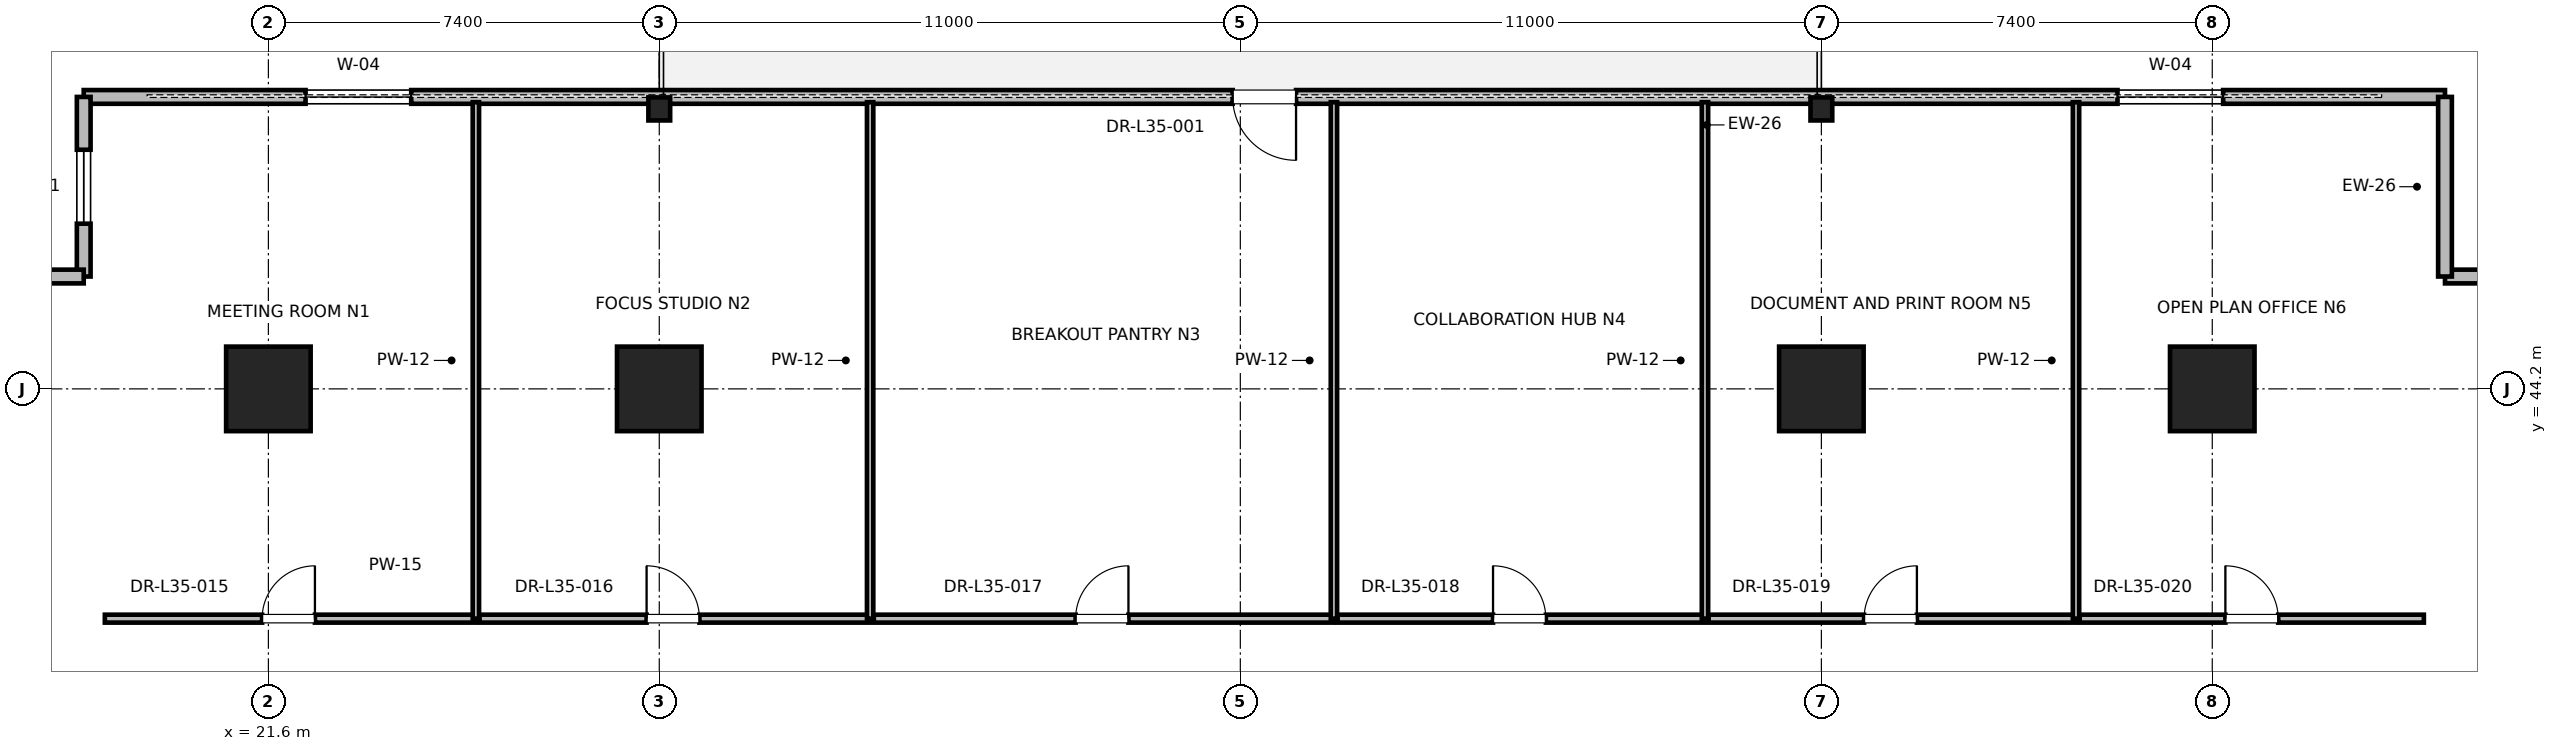
"""IFC4 building model, lengths in metres.
Left out: names, types, materials, properties, quantities, classifications, styles, units other than length and angle.
Written with IfcOpenShell. Run it as: python <this file> out.ifc"""

import sys

from ifc_helpers import new_model, si_unit, direction, frame, frame_2d, origin, origin_2d, place, context, subcontext, project, spatial, rectangle, i_section, extrude, element, fill, save


model = new_model("IFC4")
c1 = context("Model", 3, precision=1e-05, world=origin(), true_north=direction((0.0, 1.0)))
c2 = subcontext(c1, "Body", "Model", "MODEL_VIEW")
j1 = project(units=[si_unit("LENGTHUNIT", "METRE"), si_unit("PLANEANGLEUNIT", "RADIAN")], contexts=[c1])
p1 = place(None, origin())
s1 = spatial("IfcSite", under=j1, at=p1, CompositionType="ELEMENT")
p2 = place(p1, origin())
s2 = spatial("IfcBuilding", under=s1, at=p2, CompositionType="ELEMENT")
p3 = place(p2, frame((0.0, 0.0, 152.4)))
s3 = spatial("IfcBuildingStorey", under=s2, at=p3, CompositionType="ELEMENT", Elevation=152.4)
for number, where, z_axis, x_axis in (
    (1, (29.0, 44.2, 0.0), (0.0, 0.0, 1.0), (1.0, 0.0, 0.0)),
    (2, (51.0, 44.2, 0.0), (0.0, 0.0, 1.0), (1.0, 0.0, 0.0)),
    (3, (21.6, 44.2, 0.0), (0.0, 0.0, 1.0), (1.0, 0.0, 0.0)),
    (4, (58.4, 44.2, 0.0), (0.0, 0.0, 1.0), (1.0, 0.0, 0.0)),
):
    element("IfcColumn", number, at=place(p3, frame(where, z_axis=z_axis, x_axis=x_axis)), inside=s3, PredefinedType="COLUMN", context=c2, shape_type="SweptSolid", body=[
        extrude(rectangle(XDim=1.6, YDim=1.6, at=origin_2d()), origin(), (0.0, 0.0, 1.0), 4.0),
    ])
for number, where, z_axis, x_axis in (
    (5, (29.0, 49.5, 0.0), (0.0, 0.0, 1.0), (1.0, 0.0, 0.0)),
    (6, (51.0, 49.5, 0.0), (0.0, 0.0, 1.0), (1.0, 0.0, 0.0)),
):
    element("IfcColumn", number, at=place(p3, frame(where, z_axis=z_axis, x_axis=x_axis)), inside=s3, PredefinedType="COLUMN", context=c2, shape_type="SweptSolid", body=[
        extrude(i_section(OverallWidth=0.412, OverallDepth=0.437, WebThickness=0.036, FlangeThickness=0.058, FilletRadius=0.015, at=origin_2d()), origin(), (0.0, 0.0, 1.0), 4.0),
    ])
p4 = place(p3, frame((62.806, 49.727, 0.0), z_axis=(0.0, 0.0, 1.0), x_axis=(-1.0, 0.0, 0.0)))
e7 = element("IfcWall", 7, at=p4, inside=s3, PredefinedType="PARAPET", context=c2, shape_type="SweptSolid", body=[
    extrude(rectangle(XDim=44.702, YDim=0.26, at=frame_2d((22.351, 0.0))), origin(), (0.0, 0.0, 1.0), 2.97),
])
p5 = place(p4, frame((4.2, 0.0, 0.85)))
e8 = element("IfcOpeningElement", 8, at=p5, cuts=e7, PredefinedType="OPENING", context=c2, shape_type="SweptSolid", body=[
    extrude(rectangle(XDim=2.0, YDim=2.3, at=frame_2d((1.0, 1.15))), frame((0.0, 0.13, 0.0), z_axis=(0.0, -1.0, 0.0), x_axis=(1.0, 0.0, 0.0)), (0.0, 0.0, 1.0), 0.26),
])
p6 = place(p4, frame((21.751, 0.0, 0.0)))
e9 = element("IfcOpeningElement", 9, at=p6, cuts=e7, PredefinedType="OPENING", context=c2, shape_type="SweptSolid", body=[
    extrude(rectangle(XDim=1.2, YDim=2.2, at=frame_2d((0.6, 1.1))), frame((0.0, 0.13, 0.0), z_axis=(0.0, -1.0, 0.0), x_axis=(1.0, 0.0, 0.0)), (0.0, 0.0, 1.0), 0.26),
])
p7 = place(p4, frame((38.502, 0.0, 0.85)))
e10 = element("IfcOpeningElement", 10, at=p7, cuts=e7, PredefinedType="OPENING", context=c2, shape_type="SweptSolid", body=[
    extrude(rectangle(XDim=2.0, YDim=2.3, at=frame_2d((1.0, 1.15))), frame((0.0, 0.13, 0.0), z_axis=(0.0, -1.0, 0.0), x_axis=(1.0, 0.0, 0.0)), (0.0, 0.0, 1.0), 0.26),
])
p8 = place(p3, frame((66.606, 46.327, 0.0), z_axis=(0.0, 0.0, 1.0), x_axis=(-1.0, 0.0, 0.0)))
e11 = element("IfcWall", 11, at=p8, inside=s3, PredefinedType="PARAPET", context=c2, shape_type="SweptSolid", body=[
    extrude(rectangle(XDim=3.8, YDim=0.26, at=frame_2d((1.9, 0.0))), origin(), (0.0, 0.0, 1.0), 3.775),
])
p9 = place(p8, frame((1.2, 0.0, 0.85)))
e12 = element("IfcOpeningElement", 12, at=p9, cuts=e11, PredefinedType="OPENING", context=c2, shape_type="SweptSolid", body=[
    extrude(rectangle(XDim=1.4, YDim=2.0, at=frame_2d((0.7, 1.0))), frame((0.0, 0.13, 0.0), z_axis=(0.0, -1.0, 0.0), x_axis=(1.0, 0.0, 0.0)), (0.0, 0.0, 1.0), 0.26),
])
p10 = place(p3, frame((62.806, 46.327, 0.0), z_axis=(0.0, 0.0, 1.0), x_axis=(0.0, 1.0, 0.0)))
e13 = element("IfcWall", 13, at=p10, inside=s3, PredefinedType="PARAPET", context=c2, shape_type="SweptSolid", body=[
    extrude(rectangle(XDim=3.4, YDim=0.26, at=frame_2d((1.7, 0.0))), origin(), (0.0, 0.0, 1.0), 3.775),
])
p11 = place(p3, frame((18.104, 49.727, 0.0), z_axis=(0.0, 0.0, 1.0), x_axis=(0.0, -1.0, 0.0)))
e14 = element("IfcWall", 14, at=p11, inside=s3, PredefinedType="PARAPET", context=c2, shape_type="SweptSolid", body=[
    extrude(rectangle(XDim=3.4, YDim=0.26, at=frame_2d((1.7, 0.0))), origin(), (0.0, 0.0, 1.0), 3.775),
])
p12 = place(p11, frame((1.0, 0.0, 0.85)))
e15 = element("IfcOpeningElement", 15, at=p12, cuts=e14, PredefinedType="OPENING", context=c2, shape_type="SweptSolid", body=[
    extrude(rectangle(XDim=1.4, YDim=2.0, at=frame_2d((0.7, 1.0))), frame((0.0, 0.13, 0.0), z_axis=(0.0, -1.0, 0.0), x_axis=(1.0, 0.0, 0.0)), (0.0, 0.0, 1.0), 0.26),
])
p13 = place(p3, frame((18.104, 46.327, 0.0), z_axis=(0.0, 0.0, 1.0), x_axis=(-1.0, 0.0, 0.0)))
e16 = element("IfcWall", 16, at=p13, inside=s3, PredefinedType="PARAPET", context=c2, shape_type="SweptSolid", body=[
    extrude(rectangle(XDim=3.8, YDim=0.26, at=frame_2d((1.9, 0.0))), origin(), (0.0, 0.0, 1.0), 3.775),
])
p14 = place(p3, frame((18.504, 39.85, 0.0), z_axis=(0.0, 0.0, 1.0), x_axis=(1.0, 0.0, 0.0)))
e17 = element("IfcWall", 17, at=p14, inside=s3, PredefinedType="PARTITIONING", context=c2, shape_type="SweptSolid", body=[
    extrude(rectangle(XDim=7.024, YDim=0.15, at=frame_2d((3.512, 0.0))), origin(), (0.0, 0.0, 1.0), 2.85),
])
p15 = place(p14, frame((2.977, 0.0, 0.0)))
e18 = element("IfcOpeningElement", 18, at=p15, cuts=e17, PredefinedType="OPENING", context=c2, shape_type="SweptSolid", body=[
    extrude(rectangle(XDim=1.0, YDim=2.15, at=frame_2d((0.5, 1.075))), frame((0.0, 0.075, 0.0), z_axis=(0.0, -1.0, 0.0), x_axis=(1.0, 0.0, 0.0)), (0.0, 0.0, 1.0), 0.15),
])
p16 = place(p3, frame((25.528, 39.85, 0.0), z_axis=(0.0, 0.0, 1.0), x_axis=(0.0, 1.0, 0.0)))
e19 = element("IfcWall", 19, at=p16, inside=s3, PredefinedType="PARTITIONING", context=c2, shape_type="SweptSolid", body=[
    extrude(rectangle(XDim=9.777, YDim=0.12, at=frame_2d((4.889, 0.0))), origin(), (0.0, 0.0, 1.0), 2.85),
])
p17 = place(p3, frame((25.598, 39.85, 0.0), z_axis=(0.0, 0.0, 1.0), x_axis=(1.0, 0.0, 0.0)))
e20 = element("IfcWall", 20, at=p17, inside=s3, PredefinedType="PARTITIONING", context=c2, shape_type="SweptSolid", body=[
    extrude(rectangle(XDim=7.393, YDim=0.15, at=frame_2d((3.697, 0.0))), origin(), (0.0, 0.0, 1.0), 2.85),
])
p18 = place(p17, frame((3.162, 0.0, 0.0)))
e21 = element("IfcOpeningElement", 21, at=p18, cuts=e20, PredefinedType="OPENING", context=c2, shape_type="SweptSolid", body=[
    extrude(rectangle(XDim=1.0, YDim=2.15, at=frame_2d((0.5, 1.075))), frame((0.0, 0.075, 0.0), z_axis=(0.0, -1.0, 0.0), x_axis=(1.0, 0.0, 0.0)), (0.0, 0.0, 1.0), 0.15),
])
p19 = place(p3, frame((32.992, 39.85, 0.0), z_axis=(0.0, 0.0, 1.0), x_axis=(0.0, 1.0, 0.0)))
e22 = element("IfcWall", 22, at=p19, inside=s3, PredefinedType="PARTITIONING", context=c2, shape_type="SweptSolid", body=[
    extrude(rectangle(XDim=9.777, YDim=0.12, at=frame_2d((4.889, 0.0))), origin(), (0.0, 0.0, 1.0), 2.405),
])
p20 = place(p3, frame((33.062, 39.85, 0.0), z_axis=(0.0, 0.0, 1.0), x_axis=(1.0, 0.0, 0.0)))
e23 = element("IfcWall", 23, at=p20, inside=s3, PredefinedType="PARTITIONING", context=c2, shape_type="SweptSolid", body=[
    extrude(rectangle(XDim=8.71, YDim=0.15, at=frame_2d((4.355, 0.0))), origin(), (0.0, 0.0, 1.0), 2.85),
])
p21 = place(p20, frame((3.82, 0.0, 0.0)))
e24 = element("IfcOpeningElement", 24, at=p21, cuts=e23, PredefinedType="OPENING", context=c2, shape_type="SweptSolid", body=[
    extrude(rectangle(XDim=1.0, YDim=2.15, at=frame_2d((0.5, 1.075))), frame((0.0, 0.075, 0.0), z_axis=(0.0, -1.0, 0.0), x_axis=(1.0, 0.0, 0.0)), (0.0, 0.0, 1.0), 0.15),
])
p22 = place(p3, frame((41.772, 39.85, 0.0), z_axis=(0.0, 0.0, 1.0), x_axis=(0.0, 1.0, 0.0)))
e25 = element("IfcWall", 25, at=p22, inside=s3, PredefinedType="PARTITIONING", context=c2, shape_type="SweptSolid", body=[
    extrude(rectangle(XDim=9.777, YDim=0.12, at=frame_2d((4.889, 0.0))), origin(), (0.0, 0.0, 1.0), 2.405),
])
p23 = place(p3, frame((41.842, 39.85, 0.0), z_axis=(0.0, 0.0, 1.0), x_axis=(1.0, 0.0, 0.0)))
e26 = element("IfcWall", 26, at=p23, inside=s3, PredefinedType="PARTITIONING", context=c2, shape_type="SweptSolid", body=[
    extrude(rectangle(XDim=6.954, YDim=0.15, at=frame_2d((3.477, 0.0))), origin(), (0.0, 0.0, 1.0), 2.85),
])
p24 = place(p23, frame((2.942, 0.0, 0.0)))
e27 = element("IfcOpeningElement", 27, at=p24, cuts=e26, PredefinedType="OPENING", context=c2, shape_type="SweptSolid", body=[
    extrude(rectangle(XDim=1.0, YDim=2.15, at=frame_2d((0.5, 1.075))), frame((0.0, 0.075, 0.0), z_axis=(0.0, -1.0, 0.0), x_axis=(1.0, 0.0, 0.0)), (0.0, 0.0, 1.0), 0.15),
])
p25 = place(p3, frame((48.796, 39.85, 0.0), z_axis=(0.0, 0.0, 1.0), x_axis=(0.0, 1.0, 0.0)))
e28 = element("IfcWall", 28, at=p25, inside=s3, PredefinedType="PARTITIONING", context=c2, shape_type="SweptSolid", body=[
    extrude(rectangle(XDim=9.777, YDim=0.12, at=frame_2d((4.889, 0.0))), origin(), (0.0, 0.0, 1.0), 2.405),
])
p26 = place(p3, frame((48.866, 39.85, 0.0), z_axis=(0.0, 0.0, 1.0), x_axis=(1.0, 0.0, 0.0)))
e29 = element("IfcWall", 29, at=p26, inside=s3, PredefinedType="PARTITIONING", context=c2, shape_type="SweptSolid", body=[
    extrude(rectangle(XDim=6.954, YDim=0.15, at=frame_2d((3.477, 0.0))), origin(), (0.0, 0.0, 1.0), 2.85),
])
p27 = place(p26, frame((2.942, 0.0, 0.0)))
e30 = element("IfcOpeningElement", 30, at=p27, cuts=e29, PredefinedType="OPENING", context=c2, shape_type="SweptSolid", body=[
    extrude(rectangle(XDim=1.0, YDim=2.15, at=frame_2d((0.5, 1.075))), frame((0.0, 0.075, 0.0), z_axis=(0.0, -1.0, 0.0), x_axis=(1.0, 0.0, 0.0)), (0.0, 0.0, 1.0), 0.15),
])
p28 = place(p3, frame((55.821, 39.85, 0.0), z_axis=(0.0, 0.0, 1.0), x_axis=(0.0, 1.0, 0.0)))
e31 = element("IfcWall", 31, at=p28, inside=s3, PredefinedType="PARTITIONING", context=c2, shape_type="SweptSolid", body=[
    extrude(rectangle(XDim=9.777, YDim=0.12, at=frame_2d((4.889, 0.0))), origin(), (0.0, 0.0, 1.0), 2.85),
])
p29 = place(p3, frame((55.891, 39.85, 0.0), z_axis=(0.0, 0.0, 1.0), x_axis=(1.0, 0.0, 0.0)))
e32 = element("IfcWall", 32, at=p29, inside=s3, PredefinedType="PARTITIONING", context=c2, shape_type="SweptSolid", body=[
    extrude(rectangle(XDim=6.515, YDim=0.15, at=frame_2d((3.258, 0.0))), origin(), (0.0, 0.0, 1.0), 2.85),
])
p30 = place(p29, frame((2.758, 0.0, 0.0)))
e33 = element("IfcOpeningElement", 33, at=p30, cuts=e32, PredefinedType="OPENING", context=c2, shape_type="SweptSolid", body=[
    extrude(rectangle(XDim=1.0, YDim=2.15, at=frame_2d((0.5, 1.075))), frame((0.0, 0.075, 0.0), z_axis=(0.0, -1.0, 0.0), x_axis=(1.0, 0.0, 0.0)), (0.0, 0.0, 1.0), 0.15),
])
p31 = place(p5, origin())
e34 = element("IfcWindow", 34, at=p31, inside=s3, PartitioningType="SINGLE_PANEL", PredefinedType="WINDOW", context=c2, shape_type="SweptSolid", body=[
    extrude(rectangle(XDim=2.0, YDim=2.3, at=frame_2d((1.0, 1.15))), frame((0.0, 0.03, 0.0), z_axis=(0.0, -1.0, 0.0), x_axis=(1.0, 0.0, 0.0)), (0.0, 0.0, 1.0), 0.06),
])
fill(e8, e34)
p32 = place(p6, origin())
e35 = element("IfcDoor", 35, at=p32, inside=s3, OperationType="SINGLE_SWING_LEFT", PredefinedType="DOOR", context=c2, shape_type="SweptSolid", body=[
    extrude(rectangle(XDim=1.2, YDim=2.2, at=frame_2d((0.6, 1.1))), frame((0.0, 0.025, 0.0), z_axis=(0.0, -1.0, 0.0), x_axis=(1.0, 0.0, 0.0)), (0.0, 0.0, 1.0), 0.05),
])
fill(e9, e35)
p33 = place(p7, origin())
e36 = element("IfcWindow", 36, at=p33, inside=s3, PartitioningType="SINGLE_PANEL", PredefinedType="WINDOW", context=c2, shape_type="SweptSolid", body=[
    extrude(rectangle(XDim=2.0, YDim=2.3, at=frame_2d((1.0, 1.15))), frame((0.0, 0.03, 0.0), z_axis=(0.0, -1.0, 0.0), x_axis=(1.0, 0.0, 0.0)), (0.0, 0.0, 1.0), 0.06),
])
fill(e10, e36)
p34 = place(p12, origin())
e37 = element("IfcWindow", 37, at=p34, inside=s3, PartitioningType="SINGLE_PANEL", PredefinedType="WINDOW", context=c2, shape_type="SweptSolid", body=[
    extrude(rectangle(XDim=1.4, YDim=2.0, at=frame_2d((0.7, 1.0))), frame((0.0, 0.03, 0.0), z_axis=(0.0, -1.0, 0.0), x_axis=(1.0, 0.0, 0.0)), (0.0, 0.0, 1.0), 0.06),
])
fill(e15, e37)
p35 = place(p15, origin())
e38 = element("IfcDoor", 38, at=p35, inside=s3, OperationType="SINGLE_SWING_RIGHT", PredefinedType="DOOR", context=c2, shape_type="SweptSolid", body=[
    extrude(rectangle(XDim=1.0, YDim=2.15, at=frame_2d((0.5, 1.075))), frame((0.0, 0.025, 0.0), z_axis=(0.0, -1.0, 0.0), x_axis=(1.0, 0.0, 0.0)), (0.0, 0.0, 1.0), 0.05),
])
fill(e18, e38)
p36 = place(p18, origin())
e39 = element("IfcDoor", 39, at=p36, inside=s3, OperationType="SINGLE_SWING_LEFT", PredefinedType="DOOR", context=c2, shape_type="SweptSolid", body=[
    extrude(rectangle(XDim=1.0, YDim=2.15, at=frame_2d((0.5, 1.075))), frame((0.0, 0.025, 0.0), z_axis=(0.0, -1.0, 0.0), x_axis=(1.0, 0.0, 0.0)), (0.0, 0.0, 1.0), 0.05),
])
fill(e21, e39)
p37 = place(p21, origin())
e40 = element("IfcDoor", 40, at=p37, inside=s3, OperationType="SINGLE_SWING_RIGHT", PredefinedType="DOOR", context=c2, shape_type="SweptSolid", body=[
    extrude(rectangle(XDim=1.0, YDim=2.15, at=frame_2d((0.5, 1.075))), frame((0.0, 0.025, 0.0), z_axis=(0.0, -1.0, 0.0), x_axis=(1.0, 0.0, 0.0)), (0.0, 0.0, 1.0), 0.05),
])
fill(e24, e40)
p38 = place(p24, origin())
e41 = element("IfcDoor", 41, at=p38, inside=s3, OperationType="SINGLE_SWING_LEFT", PredefinedType="DOOR", context=c2, shape_type="SweptSolid", body=[
    extrude(rectangle(XDim=1.0, YDim=2.15, at=frame_2d((0.5, 1.075))), frame((0.0, 0.025, 0.0), z_axis=(0.0, -1.0, 0.0), x_axis=(1.0, 0.0, 0.0)), (0.0, 0.0, 1.0), 0.05),
])
fill(e27, e41)
p39 = place(p27, origin())
e42 = element("IfcDoor", 42, at=p39, inside=s3, OperationType="SINGLE_SWING_RIGHT", PredefinedType="DOOR", context=c2, shape_type="SweptSolid", body=[
    extrude(rectangle(XDim=1.0, YDim=2.15, at=frame_2d((0.5, 1.075))), frame((0.0, 0.025, 0.0), z_axis=(0.0, -1.0, 0.0), x_axis=(1.0, 0.0, 0.0)), (0.0, 0.0, 1.0), 0.05),
])
fill(e30, e42)
p40 = place(p30, origin())
e43 = element("IfcDoor", 43, at=p40, inside=s3, OperationType="SINGLE_SWING_LEFT", PredefinedType="DOOR", context=c2, shape_type="SweptSolid", body=[
    extrude(rectangle(XDim=1.0, YDim=2.15, at=frame_2d((0.5, 1.075))), frame((0.0, 0.025, 0.0), z_axis=(0.0, -1.0, 0.0), x_axis=(1.0, 0.0, 0.0)), (0.0, 0.0, 1.0), 0.05),
])
fill(e33, e43)
save(model, sys.argv[1])
